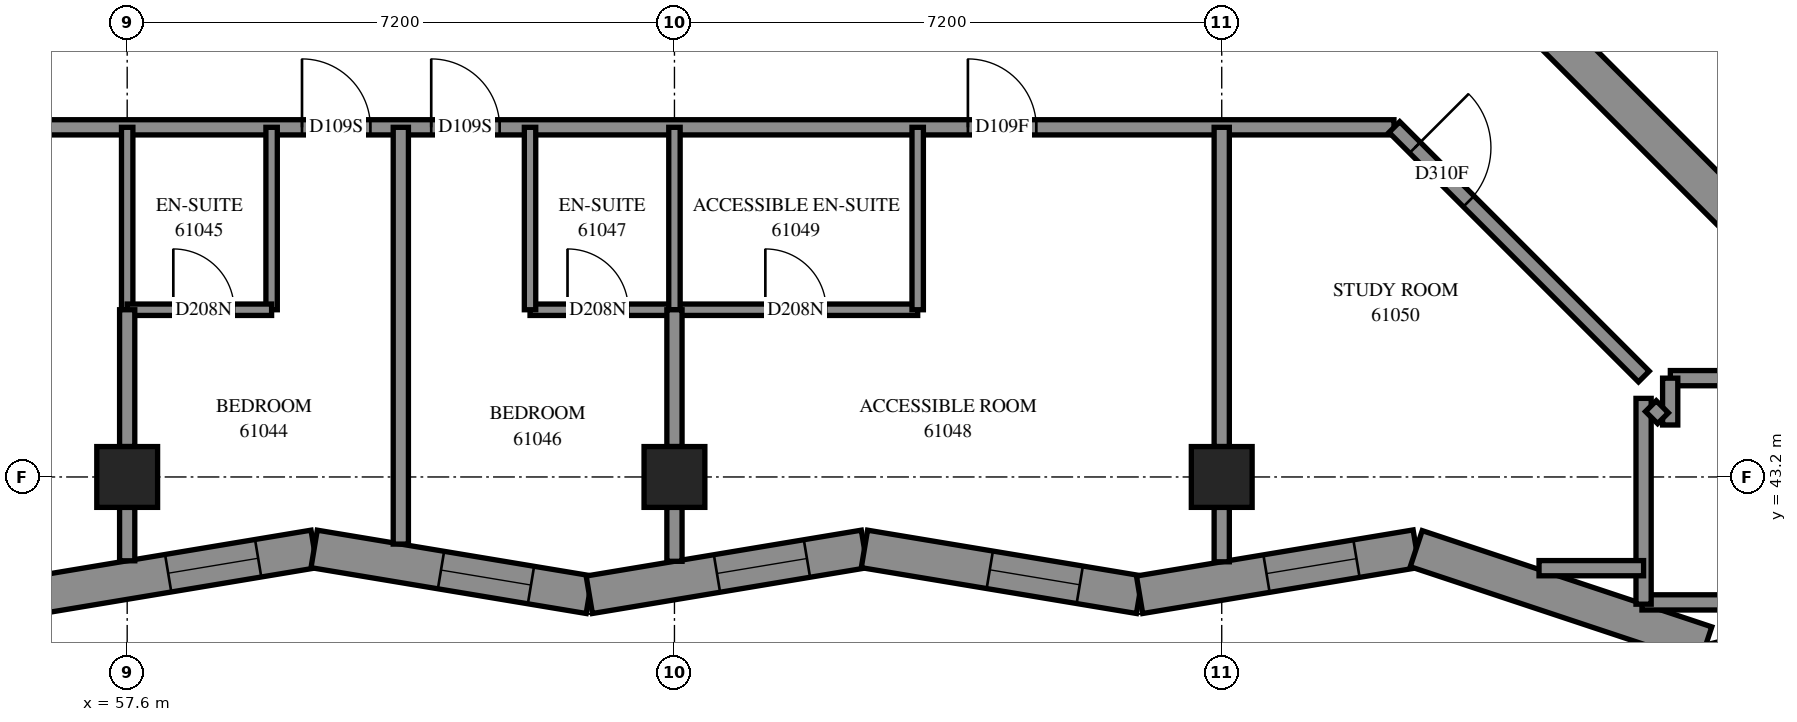
"""IFC4 building model, lengths in metres.
Left out: names, types, materials, properties, quantities, classifications, styles, units other than length and angle.
Written with IfcOpenShell. Run it as: python <this file> out.ifc"""

import sys

from ifc_helpers import new_model, si_unit, direction, frame, frame_2d, origin, origin_2d, place, context, subcontext, project, spatial, polyline, rectangle, outline, extrude, element, fill, save


model = new_model("IFC4")
c1 = context("Model", 3, precision=1e-05, world=origin(), true_north=direction((0.0, 1.0)))
c2 = subcontext(c1, "Body", "Model", "MODEL_VIEW")
j1 = project(units=[si_unit("LENGTHUNIT", "METRE"), si_unit("PLANEANGLEUNIT", "RADIAN")], contexts=[c1])
p1 = place(None, origin())
s1 = spatial("IfcSite", under=j1, at=p1, CompositionType="ELEMENT")
p2 = place(p1, origin())
s2 = spatial("IfcBuilding", under=s1, at=p2, CompositionType="ELEMENT")
p3 = place(p2, frame((0.0, 0.0, 223.6)))
s3 = spatial("IfcBuildingStorey", under=s2, at=p3, CompositionType="ELEMENT", Elevation=223.6)
for number, where, z_axis, x_axis in (
    (1, (57.6, 43.2, 0.0), (0.0, 0.0, 1.0), (1.0, 0.0, 0.0)),
    (2, (64.8, 43.2, 0.0), (0.0, 0.0, 1.0), (1.0, 0.0, 0.0)),
    (3, (72.0, 43.2, 0.0), (0.0, 0.0, 1.0), (1.0, 0.0, 0.0)),
):
    element("IfcColumn", number, at=place(p3, frame(where, z_axis=z_axis, x_axis=x_axis)), inside=s3, PredefinedType="COLUMN", context=c2, shape_type="SweptSolid", body=[
        extrude(rectangle(XDim=0.8, YDim=0.8, at=origin_2d()), origin(), (0.0, 0.0, 1.0), 3.1),
    ])
p4 = place(p3, frame((76.124, 49.267, -0.3), z_axis=(0.0, 0.0, 1.0), x_axis=(0.7071067812, -0.7071067812, 0.0)))
e4 = element("IfcWall", 4, at=p4, inside=s3, PredefinedType="SHEAR", context=c2, shape_type="SweptSolid", body=[
    extrude(rectangle(XDim=15.4, YDim=0.5, at=frame_2d((7.7, 0.0))), origin(), (0.0, 0.0, 1.0), 2.7),
])
p5 = place(p3, frame((56.44, 41.65, 0.0), z_axis=(0.0, 0.0, 1.0), x_axis=(0.9864079133, 0.1643150285, 0.0)))
e5 = element("IfcWall", 5, at=p5, inside=s3, PredefinedType="SOLIDWALL", context=c2, shape_type="SweptSolid", body=[
    extrude(outline(polyline([(-0.042, -0.25), (3.628, -0.25), (3.711, 0.25), (0.042, 0.25), (-0.042, -0.25)])), origin(), (0.0, 0.0, 1.0), 3.1),
])
p6 = place(p5, frame((1.723, 0.0, 0.45)))
e6 = element("IfcOpeningElement", 6, at=p6, cuts=e5, PredefinedType="OPENING", context=c2, shape_type="SweptSolid", body=[
    extrude(rectangle(XDim=1.2, YDim=2.5, at=frame_2d((0.6, 1.25))), frame((0.0, 0.26, 0.0), z_axis=(0.0, -1.0, 0.0), x_axis=(1.0, 0.0, 0.0)), (0.0, 0.0, 1.0), 0.52),
])
p7 = place(p3, frame((60.06, 42.253, 0.0), z_axis=(0.0, 0.0, 1.0), x_axis=(0.9864079133, -0.1643150285, 0.0)))
e7 = element("IfcWall", 7, at=p7, inside=s3, PredefinedType="SOLIDWALL", context=c2, shape_type="SweptSolid", body=[
    extrude(outline(polyline([(0.042, -0.25), (3.711, -0.25), (3.628, 0.25), (-0.042, 0.25), (0.042, -0.25)])), origin(), (0.0, 0.0, 1.0), 3.1),
])
p8 = place(p7, frame((1.692, 0.0, 0.45)))
e8 = element("IfcOpeningElement", 8, at=p8, cuts=e7, PredefinedType="OPENING", context=c2, shape_type="SweptSolid", body=[
    extrude(rectangle(XDim=1.2, YDim=2.5, at=frame_2d((0.6, 1.25))), frame((0.0, 0.26, 0.0), z_axis=(0.0, -1.0, 0.0), x_axis=(1.0, 0.0, 0.0)), (0.0, 0.0, 1.0), 0.52),
])
p9 = place(p3, frame((63.679, 41.65, 0.0), z_axis=(0.0, 0.0, 1.0), x_axis=(0.9864071775, 0.1643194453, 0.0)))
e9 = element("IfcWall", 9, at=p9, inside=s3, PredefinedType="SOLIDWALL", context=c2, shape_type="SweptSolid", body=[
    extrude(outline(polyline([(-0.042, -0.25), (3.628, -0.25), (3.711, 0.25), (0.042, 0.25), (-0.042, -0.25)])), origin(), (0.0, 0.0, 1.0), 3.1),
])
p10 = place(p9, frame((1.703, 0.0, 0.45)))
e10 = element("IfcOpeningElement", 10, at=p10, cuts=e9, PredefinedType="OPENING", context=c2, shape_type="SweptSolid", body=[
    extrude(rectangle(XDim=1.2, YDim=2.5, at=frame_2d((0.6, 1.25))), frame((0.0, 0.26, 0.0), z_axis=(0.0, -1.0, 0.0), x_axis=(1.0, 0.0, 0.0)), (0.0, 0.0, 1.0), 0.52),
])
p11 = place(p3, frame((67.299, 42.253, 0.0), z_axis=(0.0, 0.0, 1.0), x_axis=(0.9864079133, -0.1643150285, 0.0)))
e11 = element("IfcWall", 11, at=p11, inside=s3, PredefinedType="SOLIDWALL", context=c2, shape_type="SweptSolid", body=[
    extrude(outline(polyline([(0.042, -0.25), (3.711, -0.25), (3.628, 0.25), (-0.042, 0.25), (0.042, -0.25)])), origin(), (0.0, 0.0, 1.0), 3.1),
])
p12 = place(p11, frame((1.672, 0.0, 0.45)))
e12 = element("IfcOpeningElement", 12, at=p12, cuts=e11, PredefinedType="OPENING", context=c2, shape_type="SweptSolid", body=[
    extrude(rectangle(XDim=1.2, YDim=2.5, at=frame_2d((0.6, 1.25))), frame((0.0, 0.26, 0.0), z_axis=(0.0, -1.0, 0.0), x_axis=(1.0, 0.0, 0.0)), (0.0, 0.0, 1.0), 0.52),
])
p13 = place(p3, frame((70.919, 41.65, 0.0), z_axis=(0.0, 0.0, 1.0), x_axis=(0.986404908, 0.1643330686, 0.0)))
e13 = element("IfcWall", 13, at=p13, inside=s3, PredefinedType="SOLIDWALL", context=c2, shape_type="SweptSolid", body=[
    extrude(outline(polyline([(-0.042, -0.25), (3.628, -0.25), (3.752, 0.25), (0.042, 0.25), (-0.042, -0.25)])), origin(), (0.0, 0.0, 1.0), 3.1),
])
p14 = place(p13, frame((1.693, 0.0, 0.45)))
e14 = element("IfcOpeningElement", 14, at=p14, cuts=e13, PredefinedType="OPENING", context=c2, shape_type="SweptSolid", body=[
    extrude(rectangle(XDim=1.2, YDim=2.5, at=frame_2d((0.6, 1.25))), frame((0.0, 0.26, 0.0), z_axis=(0.0, -1.0, 0.0), x_axis=(1.0, 0.0, 0.0)), (0.0, 0.0, 1.0), 0.52),
])
p15 = place(p3, frame((74.559, 42.257, 0.0), z_axis=(0.0, 0.0, 1.0), x_axis=(0.9489644032, -0.3153831979, 0.0)))
e15 = element("IfcWall", 15, at=p15, inside=s3, PredefinedType="SOLIDWALL", context=c2, shape_type="SweptSolid", body=[
    extrude(outline(polyline([(0.062, -0.25), (3.877, -0.25), (4.152, 0.25), (-0.062, 0.25), (0.062, -0.25)])), origin(), (0.0, 0.0, 1.0), 3.1),
])
p16 = place(p3, frame((78.369, 40.991, 0.0), z_axis=(0.0, 0.0, 1.0), x_axis=(0.2390889045, -0.9709976806, 0.0)))
e16 = element("IfcWall", 16, at=p16, inside=s3, PredefinedType="SOLIDWALL", context=c2, shape_type="SweptSolid", body=[
    extrude(outline(polyline([(0.138, -0.25), (4.775, -0.25), (4.486, 0.25), (-0.138, 0.25), (0.138, -0.25)])), origin(), (0.0, 0.0, 1.0), 3.1),
])
p17 = place(p16, frame((2.259, 0.0, 0.45)))
e17 = element("IfcOpeningElement", 17, at=p17, cuts=e16, PredefinedType="OPENING", context=c2, shape_type="SweptSolid", body=[
    extrude(rectangle(XDim=1.2, YDim=2.5, at=frame_2d((0.6, 1.25))), frame((0.0, 0.26, 0.0), z_axis=(0.0, -1.0, 0.0), x_axis=(1.0, 0.0, 0.0)), (0.0, 0.0, 1.0), 0.52),
])
p18 = place(p3, frame((55.0, 47.8, 0.0), z_axis=(0.0, 0.0, 1.0), x_axis=(1.0, 0.0, 0.0)))
e18 = element("IfcWall", 18, at=p18, inside=s3, PredefinedType="PARTITIONING", context=c2, shape_type="SweptSolid", body=[
    extrude(rectangle(XDim=19.266, YDim=0.2, at=frame_2d((9.633, 0.0))), origin(), (0.0, 0.0, 1.0), 3.1),
])
p19 = place(p18, frame((4.9, 0.0, 0.0)))
e19 = element("IfcOpeningElement", 19, at=p19, cuts=e18, PredefinedType="OPENING", context=c2, shape_type="SweptSolid", body=[
    extrude(rectangle(XDim=0.9, YDim=2.1, at=frame_2d((0.45, 1.05))), frame((0.0, 0.11, 0.0), z_axis=(0.0, -1.0, 0.0), x_axis=(1.0, 0.0, 0.0)), (0.0, 0.0, 1.0), 0.22),
])
p20 = place(p18, frame((6.6, 0.0, 0.0)))
e20 = element("IfcOpeningElement", 20, at=p20, cuts=e18, PredefinedType="OPENING", context=c2, shape_type="SweptSolid", body=[
    extrude(rectangle(XDim=0.9, YDim=2.1, at=frame_2d((0.45, 1.05))), frame((0.0, 0.11, 0.0), z_axis=(0.0, -1.0, 0.0), x_axis=(1.0, 0.0, 0.0)), (0.0, 0.0, 1.0), 0.22),
])
p21 = place(p18, frame((13.661, 0.0, 0.0)))
e21 = element("IfcOpeningElement", 21, at=p21, cuts=e18, PredefinedType="OPENING", context=c2, shape_type="SweptSolid", body=[
    extrude(rectangle(XDim=0.9, YDim=2.1, at=frame_2d((0.45, 1.05))), frame((0.0, 0.11, 0.0), z_axis=(0.0, -1.0, 0.0), x_axis=(1.0, 0.0, 0.0)), (0.0, 0.0, 1.0), 0.22),
])
p22 = place(p3, frame((61.2, 42.317, 0.0), z_axis=(0.0, 0.0, 1.0), x_axis=(0.0, 1.0, 0.0)))
e22 = element("IfcWall", 22, at=p22, inside=s3, PredefinedType="PARTITIONING", context=c2, shape_type="SweptSolid", body=[
    extrude(rectangle(XDim=5.483, YDim=0.2, at=frame_2d((2.742, 0.0))), origin(), (0.0, 0.0, 1.0), 3.1),
])
p23 = place(p3, frame((62.9, 45.4, 0.0), z_axis=(0.0, 0.0, 1.0), x_axis=(1.0, 0.0, 0.0)))
e23 = element("IfcWall", 23, at=p23, inside=s3, PredefinedType="PARTITIONING", context=c2, shape_type="SweptSolid", body=[
    extrude(rectangle(XDim=5.1, YDim=0.15, at=frame_2d((2.55, 0.0))), origin(), (0.0, 0.0, 1.0), 3.1),
])
p24 = place(p23, frame((0.493, 0.0, 0.0)))
e24 = element("IfcOpeningElement", 24, at=p24, cuts=e23, PredefinedType="OPENING", context=c2, shape_type="SweptSolid", body=[
    extrude(rectangle(XDim=0.8, YDim=2.1, at=frame_2d((0.4, 1.05))), frame((0.0, 0.085, 0.0), z_axis=(0.0, -1.0, 0.0), x_axis=(1.0, 0.0, 0.0)), (0.0, 0.0, 1.0), 0.17),
])
p25 = place(p23, frame((3.096, 0.0, 0.0)))
e25 = element("IfcOpeningElement", 25, at=p25, cuts=e23, PredefinedType="OPENING", context=c2, shape_type="SweptSolid", body=[
    extrude(rectangle(XDim=0.8, YDim=2.1, at=frame_2d((0.4, 1.05))), frame((0.0, 0.085, 0.0), z_axis=(0.0, -1.0, 0.0), x_axis=(1.0, 0.0, 0.0)), (0.0, 0.0, 1.0), 0.17),
])
p26 = place(p3, frame((74.272, 47.803, 0.0), z_axis=(0.0, 0.0, 1.0), x_axis=(0.7071067812, -0.7071067812, 0.0)))
e26 = element("IfcWall", 26, at=p26, inside=s3, PredefinedType="PARTITIONING", context=c2, shape_type="SweptSolid", body=[
    extrude(rectangle(XDim=4.641, YDim=0.2, at=frame_2d((2.321, 0.0))), origin(), (0.0, 0.0, 1.0), 3.1),
])
p27 = place(p26, frame((0.382, 0.0, 0.0)))
e27 = element("IfcOpeningElement", 27, at=p27, cuts=e26, PredefinedType="OPENING", context=c2, shape_type="SweptSolid", body=[
    extrude(rectangle(XDim=1.0, YDim=2.1, at=frame_2d((0.5, 1.05))), frame((0.0, 0.11, 0.0), z_axis=(0.0, -1.0, 0.0), x_axis=(1.0, 0.0, 0.0)), (0.0, 0.0, 1.0), 0.22),
])
p28 = place(p3, frame((72.0, 43.6, 0.0), z_axis=(0.0, 0.0, 1.0), x_axis=(0.0, 1.0, 0.0)))
e28 = element("IfcWall", 28, at=p28, inside=s3, PredefinedType="PARTITIONING", context=c2, shape_type="SweptSolid", body=[
    extrude(rectangle(XDim=4.2, YDim=0.2, at=frame_2d((2.1, 0.0))), origin(), (0.0, 0.0, 1.0), 3.1),
])
p29 = place(p3, frame((77.528, 41.55, 0.0), z_axis=(0.0, 0.0, 1.0), x_axis=(1.0, 0.0, 0.0)))
e29 = element("IfcWall", 29, at=p29, inside=s3, PredefinedType="PARTITIONING", context=c2, shape_type="SweptSolid", body=[
    extrude(rectangle(XDim=2.705, YDim=0.2, at=frame_2d((1.353, 0.0))), origin(), (0.0, 0.0, 1.0), 3.1),
])
p30 = place(p3, frame((77.55, 41.526, 0.0), z_axis=(0.0, 0.0, 1.0), x_axis=(0.0, 1.0, 0.0)))
e30 = element("IfcWall", 30, at=p30, inside=s3, PredefinedType="PARTITIONING", context=c2, shape_type="SweptSolid", body=[
    extrude(rectangle(XDim=2.708, YDim=0.2, at=frame_2d((1.354, 0.0))), origin(), (0.0, 0.0, 1.0), 3.1),
])
p31 = place(p3, frame((77.902, 44.5, 0.0), z_axis=(0.0, 0.0, 1.0), x_axis=(1.0, 0.0, 0.0)))
e31 = element("IfcWall", 31, at=p31, inside=s3, PredefinedType="PARTITIONING", context=c2, shape_type="SweptSolid", body=[
    extrude(rectangle(XDim=2.522, YDim=0.2, at=frame_2d((1.261, 0.0))), origin(), (0.0, 0.0, 1.0), 3.1),
])
for number, where, z_axis, x_axis in (
    (32, (59.5, 45.4, 0.0), (0.0, 0.0, 1.0), (0.0, 1.0, 0.0)),
    (33, (57.6, 45.4, 0.0), (0.0, 0.0, 1.0), (0.0, 1.0, 0.0)),
    (34, (62.9, 45.4, 0.0), (0.0, 0.0, 1.0), (0.0, 1.0, 0.0)),
    (35, (68.0, 45.4, 0.0), (0.0, 0.0, 1.0), (0.0, 1.0, 0.0)),
    (36, (64.8, 45.4, 0.0), (0.0, 0.0, 1.0), (0.0, 1.0, 0.0)),
):
    element("IfcWall", number, at=place(p3, frame(where, z_axis=z_axis, x_axis=x_axis)), inside=s3, PredefinedType="PARTITIONING", context=c2, shape_type="SweptSolid", body=[
        extrude(rectangle(XDim=2.4, YDim=0.15, at=frame_2d((1.2, 0.0))), origin(), (0.0, 0.0, 1.0), 3.1),
    ])
p32 = place(p3, frame((57.6, 45.4, 0.0), z_axis=(0.0, 0.0, 1.0), x_axis=(1.0, 0.0, 0.0)))
e37 = element("IfcWall", 37, at=p32, inside=s3, PredefinedType="PARTITIONING", context=c2, shape_type="SweptSolid", body=[
    extrude(rectangle(XDim=1.9, YDim=0.15, at=frame_2d((0.95, 0.0))), origin(), (0.0, 0.0, 1.0), 3.1),
])
p33 = place(p32, frame((0.607, 0.0, 0.0)))
e38 = element("IfcOpeningElement", 38, at=p33, cuts=e37, PredefinedType="OPENING", context=c2, shape_type="SweptSolid", body=[
    extrude(rectangle(XDim=0.8, YDim=2.1, at=frame_2d((0.4, 1.05))), frame((0.0, 0.085, 0.0), z_axis=(0.0, -1.0, 0.0), x_axis=(1.0, 0.0, 0.0)), (0.0, 0.0, 1.0), 0.17),
])
for number, where, z_axis, x_axis in (
    (39, (57.6, 43.6, 0.0), (0.0, 0.0, 1.0), (0.0, 1.0, 0.0)),
    (40, (64.8, 43.6, 0.0), (0.0, 0.0, 1.0), (0.0, 1.0, 0.0)),
):
    element("IfcWall", number, at=place(p3, frame(where, z_axis=z_axis, x_axis=x_axis)), inside=s3, PredefinedType="PARTITIONING", context=c2, shape_type="SweptSolid", body=[
        extrude(rectangle(XDim=1.8, YDim=0.2, at=frame_2d((0.9, 0.0))), origin(), (0.0, 0.0, 1.0), 3.1),
    ])
p34 = place(p3, frame((76.174, 42.0, 0.0), z_axis=(0.0, 0.0, 1.0), x_axis=(1.0, 0.0, 0.0)))
e41 = element("IfcWall", 41, at=p34, inside=s3, PredefinedType="PARTITIONING", context=c2, shape_type="SweptSolid", body=[
    extrude(rectangle(XDim=1.375, YDim=0.2, at=frame_2d((0.688, 0.0))), origin(), (0.0, 0.0, 1.0), 3.1),
])
p35 = place(p3, frame((72.0, 42.084, 0.0), z_axis=(0.0, 0.0, 1.0), x_axis=(0.0, 1.0, 0.0)))
e42 = element("IfcWall", 42, at=p35, inside=s3, PredefinedType="PARTITIONING", context=c2, shape_type="SweptSolid", body=[
    extrude(rectangle(XDim=0.716, YDim=0.2, at=frame_2d((0.358, 0.0))), origin(), (0.0, 0.0, 1.0), 3.1),
])
p36 = place(p3, frame((64.8, 42.091, 0.0), z_axis=(0.0, 0.0, 1.0), x_axis=(0.0, 1.0, 0.0)))
e43 = element("IfcWall", 43, at=p36, inside=s3, PredefinedType="PARTITIONING", context=c2, shape_type="SweptSolid", body=[
    extrude(rectangle(XDim=0.709, YDim=0.2, at=frame_2d((0.355, 0.0))), origin(), (0.0, 0.0, 1.0), 3.1),
])
p37 = place(p3, frame((57.6, 42.097, 0.0), z_axis=(0.0, 0.0, 1.0), x_axis=(0.0, 1.0, 0.0)))
e44 = element("IfcWall", 44, at=p37, inside=s3, PredefinedType="PARTITIONING", context=c2, shape_type="SweptSolid", body=[
    extrude(rectangle(XDim=0.703, YDim=0.2, at=frame_2d((0.351, 0.0))), origin(), (0.0, 0.0, 1.0), 3.1),
])
p38 = place(p3, frame((77.9, 43.884, 0.0), z_axis=(0.0, 0.0, 1.0), x_axis=(0.0, 1.0, 0.0)))
e45 = element("IfcWall", 45, at=p38, inside=s3, PredefinedType="PARTITIONING", context=c2, shape_type="SweptSolid", body=[
    extrude(rectangle(XDim=0.616, YDim=0.2, at=frame_2d((0.308, 0.0))), origin(), (0.0, 0.0, 1.0), 3.1),
])
p39 = place(p3, frame((77.646, 44.132, 0.0), z_axis=(0.0, 0.0, 1.0), x_axis=(0.7068844555, -0.707329037, 0.0)))
e46 = element("IfcWall", 46, at=p39, inside=s3, PredefinedType="PARTITIONING", context=c2, shape_type="SweptSolid", body=[
    extrude(rectangle(XDim=0.225, YDim=0.2, at=frame_2d((0.112, 0.0))), origin(), (0.0, 0.0, 1.0), 3.1),
])
p40 = place(p6, origin())
e47 = element("IfcWindow", 47, at=p40, inside=s3, PartitioningType="SINGLE_PANEL", PredefinedType="WINDOW", context=c2, shape_type="SweptSolid", body=[
    extrude(rectangle(XDim=1.2, YDim=2.5, at=frame_2d((0.6, 1.25))), frame((0.0, 0.18, 0.0), z_axis=(0.0, -1.0, 0.0), x_axis=(1.0, 0.0, 0.0)), (0.0, 0.0, 1.0), 0.06),
])
fill(e6, e47)
p41 = place(p8, origin())
e48 = element("IfcWindow", 48, at=p41, inside=s3, PartitioningType="SINGLE_PANEL", PredefinedType="WINDOW", context=c2, shape_type="SweptSolid", body=[
    extrude(rectangle(XDim=1.2, YDim=2.5, at=frame_2d((0.6, 1.25))), frame((0.0, 0.18, 0.0), z_axis=(0.0, -1.0, 0.0), x_axis=(1.0, 0.0, 0.0)), (0.0, 0.0, 1.0), 0.06),
])
fill(e8, e48)
p42 = place(p10, origin())
e49 = element("IfcWindow", 49, at=p42, inside=s3, PartitioningType="SINGLE_PANEL", PredefinedType="WINDOW", context=c2, shape_type="SweptSolid", body=[
    extrude(rectangle(XDim=1.2, YDim=2.5, at=frame_2d((0.6, 1.25))), frame((0.0, 0.18, 0.0), z_axis=(0.0, -1.0, 0.0), x_axis=(1.0, 0.0, 0.0)), (0.0, 0.0, 1.0), 0.06),
])
fill(e10, e49)
p43 = place(p12, origin())
e50 = element("IfcWindow", 50, at=p43, inside=s3, PartitioningType="SINGLE_PANEL", PredefinedType="WINDOW", context=c2, shape_type="SweptSolid", body=[
    extrude(rectangle(XDim=1.2, YDim=2.5, at=frame_2d((0.6, 1.25))), frame((0.0, 0.18, 0.0), z_axis=(0.0, -1.0, 0.0), x_axis=(1.0, 0.0, 0.0)), (0.0, 0.0, 1.0), 0.06),
])
fill(e12, e50)
p44 = place(p14, origin())
e51 = element("IfcWindow", 51, at=p44, inside=s3, PartitioningType="SINGLE_PANEL", PredefinedType="WINDOW", context=c2, shape_type="SweptSolid", body=[
    extrude(rectangle(XDim=1.2, YDim=2.5, at=frame_2d((0.6, 1.25))), frame((0.0, 0.18, 0.0), z_axis=(0.0, -1.0, 0.0), x_axis=(1.0, 0.0, 0.0)), (0.0, 0.0, 1.0), 0.06),
])
fill(e14, e51)
p45 = place(p19, origin())
e52 = element("IfcDoor", 52, at=p45, inside=s3, OperationType="SINGLE_SWING_LEFT", PredefinedType="DOOR", context=c2, shape_type="SweptSolid", body=[
    extrude(rectangle(XDim=0.9, YDim=2.1, at=frame_2d((0.45, 1.05))), frame((0.0, 0.025, 0.0), z_axis=(0.0, -1.0, 0.0), x_axis=(1.0, 0.0, 0.0)), (0.0, 0.0, 1.0), 0.05),
])
fill(e19, e52)
p46 = place(p33, origin())
e53 = element("IfcDoor", 53, at=p46, inside=s3, OperationType="SINGLE_SWING_RIGHT", PredefinedType="DOOR", context=c2, shape_type="SweptSolid", body=[
    extrude(rectangle(XDim=0.8, YDim=2.1, at=frame_2d((0.4, 1.05))), frame((0.0, 0.025, 0.0), z_axis=(0.0, -1.0, 0.0), x_axis=(1.0, 0.0, 0.0)), (0.0, 0.0, 1.0), 0.05),
])
fill(e38, e53)
p47 = place(p20, origin())
e54 = element("IfcDoor", 54, at=p47, inside=s3, OperationType="SINGLE_SWING_RIGHT", PredefinedType="DOOR", context=c2, shape_type="SweptSolid", body=[
    extrude(rectangle(XDim=0.9, YDim=2.1, at=frame_2d((0.45, 1.05))), frame((0.0, 0.025, 0.0), z_axis=(0.0, -1.0, 0.0), x_axis=(1.0, 0.0, 0.0)), (0.0, 0.0, 1.0), 0.05),
])
fill(e20, e54)
p48 = place(p24, origin())
e55 = element("IfcDoor", 55, at=p48, inside=s3, OperationType="SINGLE_SWING_RIGHT", PredefinedType="DOOR", context=c2, shape_type="SweptSolid", body=[
    extrude(rectangle(XDim=0.8, YDim=2.1, at=frame_2d((0.4, 1.05))), frame((0.0, 0.025, 0.0), z_axis=(0.0, -1.0, 0.0), x_axis=(1.0, 0.0, 0.0)), (0.0, 0.0, 1.0), 0.05),
])
fill(e24, e55)
p49 = place(p21, origin())
e56 = element("IfcDoor", 56, at=p49, inside=s3, OperationType="SINGLE_SWING_LEFT", PredefinedType="DOOR", context=c2, shape_type="SweptSolid", body=[
    extrude(rectangle(XDim=0.9, YDim=2.1, at=frame_2d((0.45, 1.05))), frame((0.0, 0.025, 0.0), z_axis=(0.0, -1.0, 0.0), x_axis=(1.0, 0.0, 0.0)), (0.0, 0.0, 1.0), 0.05),
])
fill(e21, e56)
p50 = place(p25, origin())
e57 = element("IfcDoor", 57, at=p50, inside=s3, OperationType="SINGLE_SWING_RIGHT", PredefinedType="DOOR", context=c2, shape_type="SweptSolid", body=[
    extrude(rectangle(XDim=0.8, YDim=2.1, at=frame_2d((0.4, 1.05))), frame((0.0, 0.025, 0.0), z_axis=(0.0, -1.0, 0.0), x_axis=(1.0, 0.0, 0.0)), (0.0, 0.0, 1.0), 0.05),
])
fill(e25, e57)
p51 = place(p27, origin())
e58 = element("IfcDoor", 58, at=p51, inside=s3, OperationType="SINGLE_SWING_LEFT", PredefinedType="DOOR", context=c2, shape_type="SweptSolid", body=[
    extrude(rectangle(XDim=1.0, YDim=2.1, at=frame_2d((0.5, 1.05))), frame((0.0, 0.025, 0.0), z_axis=(0.0, -1.0, 0.0), x_axis=(1.0, 0.0, 0.0)), (0.0, 0.0, 1.0), 0.05),
])
fill(e27, e58)
save(model, sys.argv[1])
